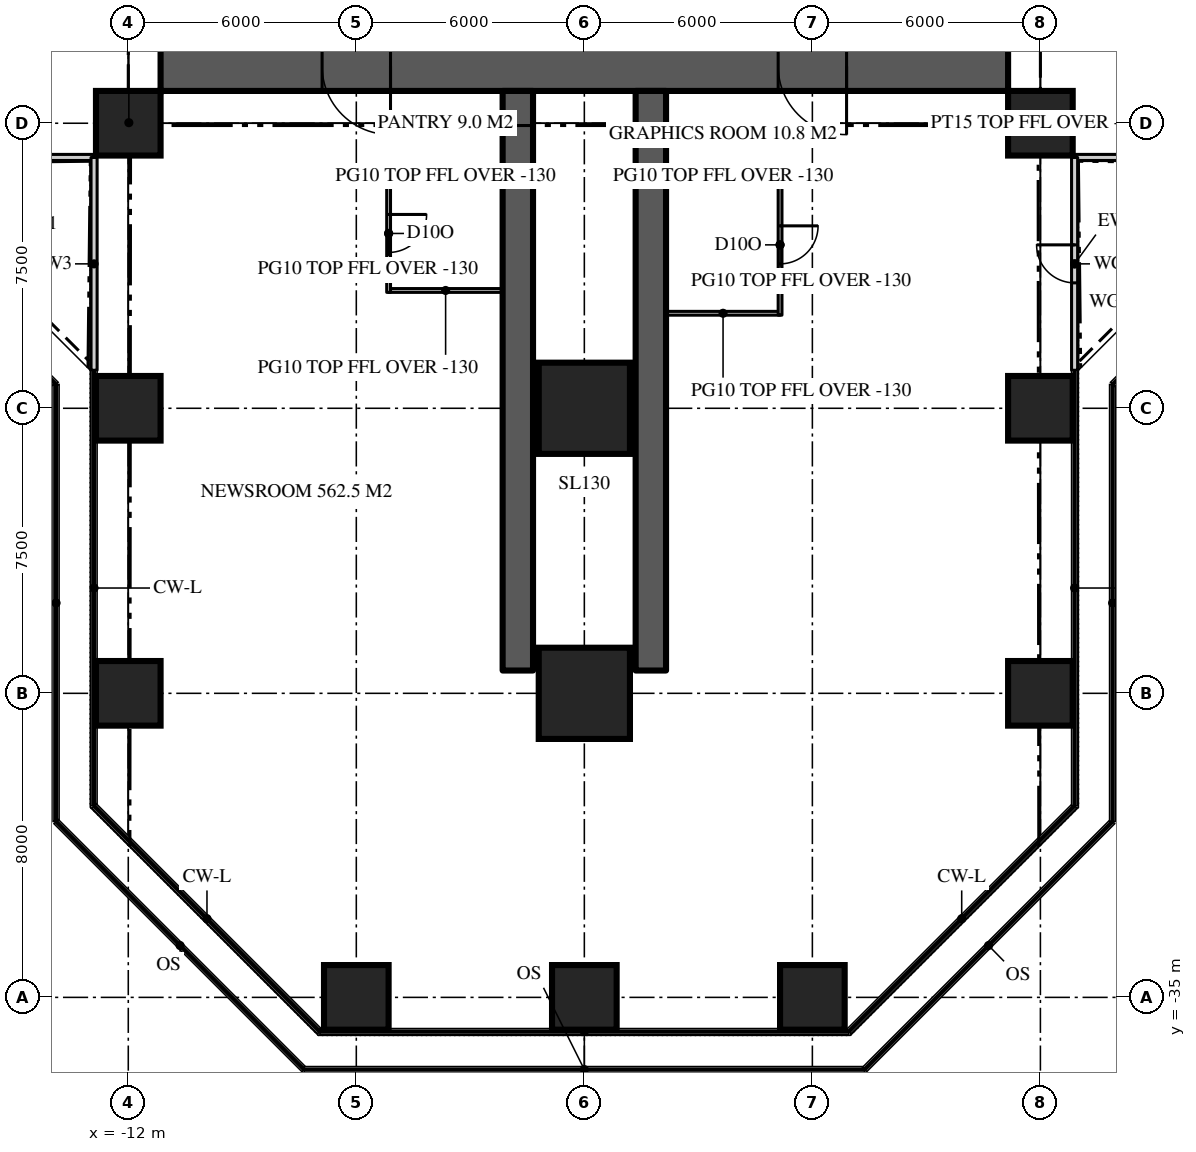
"""IFC4 building model, lengths in metres.
Left out: names, types, materials, properties, quantities, classifications, styles, units other than length and angle.
Written with IfcOpenShell. Run it as: python <this file> out.ifc"""

import sys

from ifc_helpers import new_model, si_unit, direction, frame, frame_2d, origin, origin_2d, place, context, subcontext, project, spatial, rectangle, extrude, element, fill, save


model = new_model("IFC4")
c1 = context("Model", 3, precision=1e-05, world=origin(), true_north=direction((0.0, 1.0)))
c2 = subcontext(c1, "Body", "Model", "MODEL_VIEW")
j1 = project(units=[si_unit("LENGTHUNIT", "METRE"), si_unit("PLANEANGLEUNIT", "RADIAN")], contexts=[c1])
p1 = place(None, origin())
s1 = spatial("IfcSite", under=j1, at=p1, CompositionType="ELEMENT")
p2 = place(p1, origin())
s2 = spatial("IfcBuilding", under=s1, at=p2, CompositionType="ELEMENT")
p3 = place(p2, frame((0.0, 0.0, 47.4)))
s3 = spatial("IfcBuildingStorey", under=s2, at=p3, CompositionType="ELEMENT", Elevation=47.4)
p4 = place(p3, frame((11.15, -10.5, 0.0), z_axis=(0.0, 0.0, 1.0), x_axis=(-1.0, 0.0, 0.0)))
e1 = element("IfcWall", 1, at=p4, inside=s3, PredefinedType="SHEAR", context=c2, shape_type="SweptSolid", body=[
    extrude(rectangle(XDim=22.3, YDim=1.3, at=frame_2d((11.15, 0.0))), origin(), (0.0, 0.0, 1.0), 3.9),
])
p5 = place(p4, frame((16.25, 0.0, 0.0)))
e2 = element("IfcOpeningElement", 2, at=p5, cuts=e1, PredefinedType="OPENING", context=c2, shape_type="SweptSolid", body=[
    extrude(rectangle(XDim=1.8, YDim=2.2, at=frame_2d((0.9, 1.1))), frame((0.0, 0.66, 0.0), z_axis=(0.0, -1.0, 0.0), x_axis=(1.0, 0.0, 0.0)), (0.0, 0.0, 1.0), 1.32),
])
p6 = place(p4, frame((4.25, 0.0, 0.0)))
e3 = element("IfcOpeningElement", 3, at=p6, cuts=e1, PredefinedType="OPENING", context=c2, shape_type="SweptSolid", body=[
    extrude(rectangle(XDim=1.8, YDim=2.2, at=frame_2d((0.9, 1.1))), frame((0.0, 0.66, 0.0), z_axis=(0.0, -1.0, 0.0), x_axis=(1.0, 0.0, 0.0)), (0.0, 0.0, 1.0), 1.32),
])
for number, where, z_axis, x_axis in (
    (4, (-1.75, -11.15, 0.0), (0.0, 0.0, 1.0), (0.0, -1.0, 0.0)),
    (5, (1.75, -11.15, 0.0), (0.0, 0.0, 1.0), (0.0, -1.0, 0.0)),
):
    element("IfcWall", number, at=place(p3, frame(where, z_axis=z_axis, x_axis=x_axis)), inside=s3, PredefinedType="SHEAR", context=c2, shape_type="SweptSolid", body=[
        extrude(rectangle(XDim=15.25, YDim=0.8, at=frame_2d((7.625, 0.0))), origin(), (0.0, 0.0, 1.0), 3.9),
    ])
for number, where, z_axis, x_axis in (
    (6, (-6.0, -35.0, 0.0), (0.0, 0.0, 1.0), (1.0, 0.0, 0.0)),
    (7, (0.0, -35.0, 0.0), (0.0, 0.0, 1.0), (1.0, 0.0, 0.0)),
    (8, (6.0, -35.0, 0.0), (0.0, 0.0, 1.0), (1.0, 0.0, 0.0)),
    (9, (-12.0, -27.0, 0.0), (0.0, 0.0, 1.0), (1.0, 0.0, 0.0)),
):
    element("IfcColumn", number, at=place(p3, frame(where, z_axis=z_axis, x_axis=x_axis)), inside=s3, PredefinedType="COLUMN", context=c2, shape_type="SweptSolid", body=[
        extrude(rectangle(XDim=1.7, YDim=1.7, at=origin_2d()), origin(), (0.0, 0.0, 1.0), 3.9),
    ])
p7 = place(p3, frame((0.0, -27.0, 0.0), z_axis=(0.0, 0.0, 1.0), x_axis=(1.0, 0.0, 0.0)))
e10 = element("IfcColumn", 10, at=p7, inside=s3, PredefinedType="COLUMN", context=c2, shape_type="SweptSolid", body=[
    extrude(rectangle(XDim=2.4, YDim=2.4, at=origin_2d()), origin(), (0.0, 0.0, 1.0), 3.9),
])
for number, where, z_axis, x_axis in (
    (11, (12.0, -27.0, 0.0), (0.0, 0.0, 1.0), (1.0, 0.0, 0.0)),
    (12, (-12.0, -19.5, 0.0), (0.0, 0.0, 1.0), (1.0, 0.0, 0.0)),
):
    element("IfcColumn", number, at=place(p3, frame(where, z_axis=z_axis, x_axis=x_axis)), inside=s3, PredefinedType="COLUMN", context=c2, shape_type="SweptSolid", body=[
        extrude(rectangle(XDim=1.7, YDim=1.7, at=origin_2d()), origin(), (0.0, 0.0, 1.0), 3.9),
    ])
p8 = place(p3, frame((0.0, -19.5, 0.0), z_axis=(0.0, 0.0, 1.0), x_axis=(1.0, 0.0, 0.0)))
e13 = element("IfcColumn", 13, at=p8, inside=s3, PredefinedType="COLUMN", context=c2, shape_type="SweptSolid", body=[
    extrude(rectangle(XDim=2.4, YDim=2.4, at=origin_2d()), origin(), (0.0, 0.0, 1.0), 3.9),
])
for number, where, z_axis, x_axis in (
    (14, (12.0, -19.5, 0.0), (0.0, 0.0, 1.0), (1.0, 0.0, 0.0)),
    (15, (-12.0, -12.0, 0.0), (0.0, 0.0, 1.0), (1.0, 0.0, 0.0)),
    (16, (12.0, -12.0, 0.0), (0.0, 0.0, 1.0), (1.0, 0.0, 0.0)),
):
    element("IfcColumn", number, at=place(p3, frame(where, z_axis=z_axis, x_axis=x_axis)), inside=s3, PredefinedType="COLUMN", context=c2, shape_type="SweptSolid", body=[
        extrude(rectangle(XDim=1.7, YDim=1.7, at=origin_2d()), origin(), (0.0, 0.0, 1.0), 3.9),
    ])
p9 = place(p3, frame((12.9, -12.9, 0.0), z_axis=(0.0, 0.0, 1.0), x_axis=(1.0, 0.0, 0.0)))
e17 = element("IfcWall", 17, at=p9, inside=s3, PredefinedType="SOLIDWALL", context=c2, shape_type="SweptSolid", body=[
    extrude(rectangle(XDim=5.6, YDim=0.16, at=frame_2d((2.8, 0.0))), origin(), (0.0, 0.0, 1.0), 3.77),
])
p10 = place(p3, frame((-18.5, -12.9, 0.0), z_axis=(0.0, 0.0, 1.0), x_axis=(1.0, 0.0, 0.0)))
e18 = element("IfcWall", 18, at=p10, inside=s3, PredefinedType="SOLIDWALL", context=c2, shape_type="SweptSolid", body=[
    extrude(rectangle(XDim=5.6, YDim=0.16, at=frame_2d((2.8, 0.0))), origin(), (0.0, 0.0, 1.0), 3.77),
])
p11 = place(p10, frame((2.3, 0.0, 0.0)))
e19 = element("IfcOpeningElement", 19, at=p11, cuts=e18, PredefinedType="OPENING", context=c2, shape_type="SweptSolid", body=[
    extrude(rectangle(XDim=1.0, YDim=2.2, at=frame_2d((0.5, 1.1))), frame((0.0, 0.09, 0.0), z_axis=(0.0, -1.0, 0.0), x_axis=(1.0, 0.0, 0.0)), (0.0, 0.0, 1.0), 0.18),
])
p12 = place(p3, frame((-12.9, -12.9, 0.0), z_axis=(0.0, 0.0, 1.0), x_axis=(0.0, -1.0, 0.0)))
e20 = element("IfcWall", 20, at=p12, inside=s3, PredefinedType="SOLIDWALL", context=c2, shape_type="SweptSolid", body=[
    extrude(rectangle(XDim=5.6, YDim=0.16, at=frame_2d((2.8, 0.0))), origin(), (0.0, 0.0, 1.0), 3.77),
])
p13 = place(p3, frame((12.9, -18.5, 0.0), z_axis=(0.0, 0.0, 1.0), x_axis=(0.0, 1.0, 0.0)))
e21 = element("IfcWall", 21, at=p13, inside=s3, PredefinedType="SOLIDWALL", context=c2, shape_type="SweptSolid", body=[
    extrude(rectangle(XDim=5.6, YDim=0.16, at=frame_2d((2.8, 0.0))), origin(), (0.0, 0.0, 1.0), 3.77),
])
p14 = place(p13, frame((2.3, 0.0, 0.0)))
e22 = element("IfcOpeningElement", 22, at=p14, cuts=e21, PredefinedType="OPENING", context=c2, shape_type="SweptSolid", body=[
    extrude(rectangle(XDim=1.0, YDim=2.2, at=frame_2d((0.5, 1.1))), frame((0.0, 0.09, 0.0), z_axis=(0.0, -1.0, 0.0), x_axis=(1.0, 0.0, 0.0)), (0.0, 0.0, 1.0), 0.18),
])
for number, where, z_axis, x_axis in (
    (23, (2.15, -13.4, 0.0), (0.0, 0.0, 1.0), (1.0, 0.0, 0.0)),
    (24, (2.15, -17.0, 0.0), (0.0, 0.0, 1.0), (1.0, 0.0, 0.0)),
):
    element("IfcWall", number, at=place(p3, frame(where, z_axis=z_axis, x_axis=x_axis)), inside=s3, PredefinedType="PARTITIONING", context=c2, shape_type="SweptSolid", body=[
        extrude(rectangle(XDim=3.0, YDim=0.1, at=frame_2d((1.5, 0.0))), origin(), (0.0, 0.0, 1.0), 3.77),
    ])
p15 = place(p3, frame((5.15, -13.35, 0.0), z_axis=(0.0, 0.0, 1.0), x_axis=(0.0, -1.0, 0.0)))
e25 = element("IfcWall", 25, at=p15, inside=s3, PredefinedType="PARTITIONING", context=c2, shape_type="SweptSolid", body=[
    extrude(rectangle(XDim=3.7, YDim=0.1, at=frame_2d((1.85, 0.0))), origin(), (0.0, 0.0, 1.0), 3.77),
])
p16 = place(p15, frame((1.35, 0.0, 0.0)))
e26 = element("IfcOpeningElement", 26, at=p16, cuts=e25, PredefinedType="OPENING", context=c2, shape_type="SweptSolid", body=[
    extrude(rectangle(XDim=1.0, YDim=2.2, at=frame_2d((0.5, 1.1))), frame((0.0, 0.06, 0.0), z_axis=(0.0, -1.0, 0.0), x_axis=(1.0, 0.0, 0.0)), (0.0, 0.0, 1.0), 0.12),
])
for number, where, z_axis, x_axis in (
    (27, (-2.15, -13.4, 0.0), (0.0, 0.0, 1.0), (-1.0, 0.0, 0.0)),
    (28, (-2.15, -16.4, 0.0), (0.0, 0.0, 1.0), (-1.0, 0.0, 0.0)),
):
    element("IfcWall", number, at=place(p3, frame(where, z_axis=z_axis, x_axis=x_axis)), inside=s3, PredefinedType="PARTITIONING", context=c2, shape_type="SweptSolid", body=[
        extrude(rectangle(XDim=3.0, YDim=0.1, at=frame_2d((1.5, 0.0))), origin(), (0.0, 0.0, 1.0), 3.77),
    ])
p17 = place(p3, frame((-5.15, -13.35, 0.0), z_axis=(0.0, 0.0, 1.0), x_axis=(0.0, -1.0, 0.0)))
e29 = element("IfcWall", 29, at=p17, inside=s3, PredefinedType="PARTITIONING", context=c2, shape_type="SweptSolid", body=[
    extrude(rectangle(XDim=3.1, YDim=0.1, at=frame_2d((1.55, 0.0))), origin(), (0.0, 0.0, 1.0), 3.77),
])
p18 = place(p17, frame((1.05, 0.0, 0.0)))
e30 = element("IfcOpeningElement", 30, at=p18, cuts=e29, PredefinedType="OPENING", context=c2, shape_type="SweptSolid", body=[
    extrude(rectangle(XDim=1.0, YDim=2.2, at=frame_2d((0.5, 1.1))), frame((0.0, 0.06, 0.0), z_axis=(0.0, -1.0, 0.0), x_axis=(1.0, 0.0, 0.0)), (0.0, 0.0, 1.0), 0.12),
])
for number, where, z_axis, x_axis in (
    (31, (-11.15, -11.15, 0.0), (0.0, 0.0, 1.0), (-0.707, -0.707, 0.0)),
    (32, (11.15, -11.15, 0.0), (0.0, 0.0, 1.0), (0.707, -0.707, 0.0)),
):
    element("IfcWall", number, at=place(p3, frame(where, z_axis=z_axis, x_axis=x_axis)), inside=s3, PredefinedType="PARTITIONING", context=c2, shape_type="SweptSolid", body=[
        extrude(rectangle(XDim=2.362, YDim=0.15, at=frame_2d((1.181, 0.0))), origin(), (0.0, 0.0, 1.0), 3.22),
    ])
p19 = place(p14, origin())
e33 = element("IfcDoor", 33, at=p19, inside=s3, OperationType="SINGLE_SWING_RIGHT", PredefinedType="DOOR", context=c2, shape_type="SweptSolid", body=[
    extrude(rectangle(XDim=1.0, YDim=2.2, at=frame_2d((0.5, 1.1))), frame((0.0, 0.025, 0.0), z_axis=(0.0, -1.0, 0.0), x_axis=(1.0, 0.0, 0.0)), (0.0, 0.0, 1.0), 0.05),
])
fill(e22, e33)
p20 = place(p5, origin())
e34 = element("IfcDoor", 34, at=p20, inside=s3, OperationType="DOUBLE_DOOR_DOUBLE_SWING", PredefinedType="DOOR", context=c2, shape_type="SweptSolid", body=[
    extrude(rectangle(XDim=1.8, YDim=2.2, at=frame_2d((0.9, 1.1))), frame((0.0, 0.025, 0.0), z_axis=(0.0, -1.0, 0.0), x_axis=(1.0, 0.0, 0.0)), (0.0, 0.0, 1.0), 0.05),
])
fill(e2, e34)
p21 = place(p6, origin())
e35 = element("IfcDoor", 35, at=p21, inside=s3, OperationType="DOUBLE_DOOR_DOUBLE_SWING", PredefinedType="DOOR", context=c2, shape_type="SweptSolid", body=[
    extrude(rectangle(XDim=1.8, YDim=2.2, at=frame_2d((0.9, 1.1))), frame((0.0, 0.025, 0.0), z_axis=(0.0, -1.0, 0.0), x_axis=(1.0, 0.0, 0.0)), (0.0, 0.0, 1.0), 0.05),
])
fill(e3, e35)
p22 = place(p16, origin())
e36 = element("IfcDoor", 36, at=p22, inside=s3, OperationType="SINGLE_SWING_LEFT", PredefinedType="DOOR", context=c2, shape_type="SweptSolid", body=[
    extrude(rectangle(XDim=1.0, YDim=2.2, at=frame_2d((0.5, 1.1))), frame((0.0, 0.025, 0.0), z_axis=(0.0, -1.0, 0.0), x_axis=(1.0, 0.0, 0.0)), (0.0, 0.0, 1.0), 0.05),
])
fill(e26, e36)
p23 = place(p18, origin())
e37 = element("IfcDoor", 37, at=p23, inside=s3, OperationType="SINGLE_SWING_LEFT", PredefinedType="DOOR", context=c2, shape_type="SweptSolid", body=[
    extrude(rectangle(XDim=1.0, YDim=2.2, at=frame_2d((0.5, 1.1))), frame((0.0, 0.025, 0.0), z_axis=(0.0, -1.0, 0.0), x_axis=(1.0, 0.0, 0.0)), (0.0, 0.0, 1.0), 0.05),
])
fill(e30, e37)
save(model, sys.argv[1])
